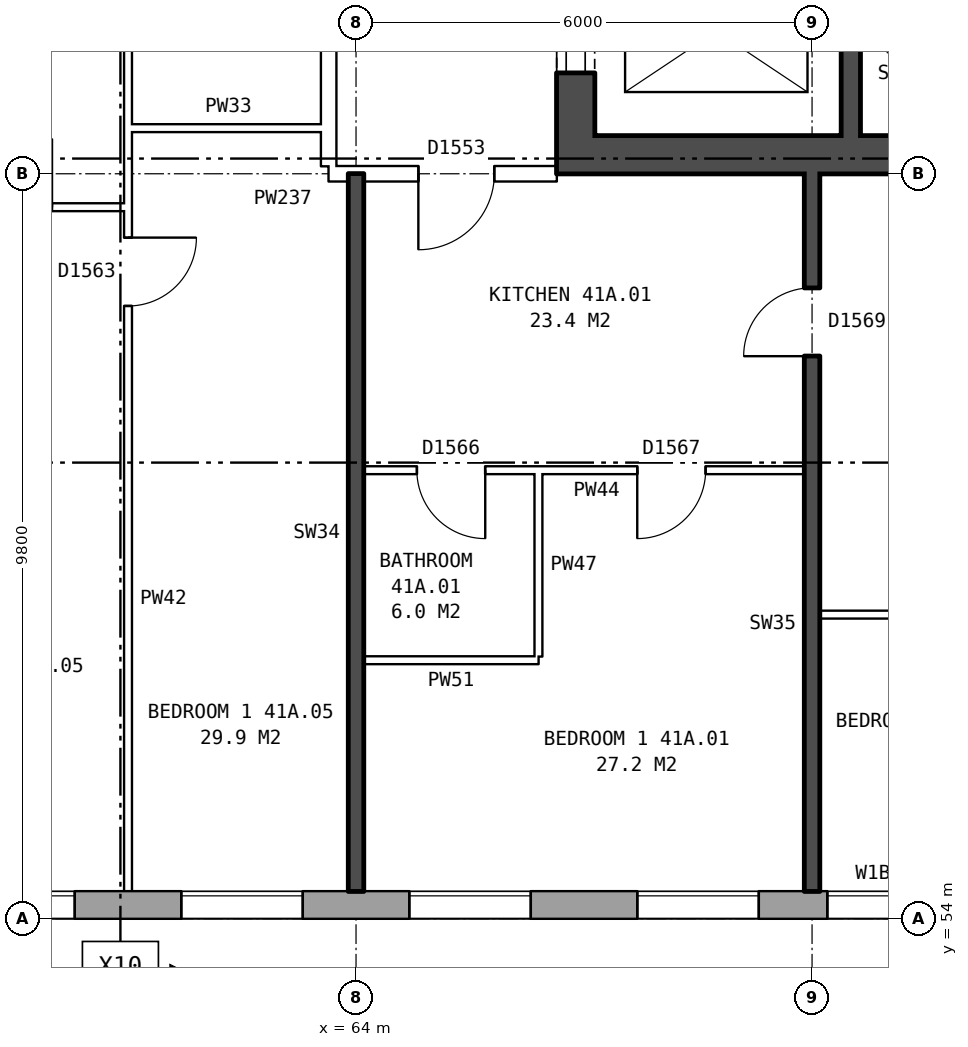
"""IFC4 building model, lengths in metres.
Left out: names, types, materials, properties, quantities, classifications, styles, units other than length and angle.
Written with IfcOpenShell. Run it as: python <this file> out.ifc"""

import sys

from ifc_helpers import new_model, si_unit, direction, frame, frame_2d, origin, place, context, subcontext, project, spatial, rectangle, extrude, element, fill, save


model = new_model("IFC4")
c1 = context("Model", 3, precision=1e-05, world=origin(), true_north=direction((0.0, 1.0)))
c2 = subcontext(c1, "Body", "Model", "MODEL_VIEW")
j1 = project(units=[si_unit("LENGTHUNIT", "METRE"), si_unit("PLANEANGLEUNIT", "RADIAN")], contexts=[c1])
p1 = place(None, origin())
s1 = spatial("IfcSite", under=j1, at=p1, CompositionType="ELEMENT")
p2 = place(p1, origin())
s2 = spatial("IfcBuilding", under=s1, at=p2, CompositionType="ELEMENT")
p3 = place(p2, frame((0.0, 0.0, 148.5)))
s3 = spatial("IfcBuildingStorey", under=s2, at=p3, CompositionType="ELEMENT", Elevation=148.5)
p4 = place(p3, frame((31.575, 54.18, 0.0), z_axis=(0.0, 0.0, 1.0), x_axis=(1.0, 0.0, 0.0)))
e1 = element("IfcWall", 1, at=p4, inside=s3, PredefinedType="STANDARD", context=c2, shape_type="SweptSolid", body=[
    extrude(rectangle(XDim=41.351, YDim=0.36, at=frame_2d((20.675, 0.0))), origin(), (0.0, 0.0, 1.0), 2.85),
])
p5 = place(p4, frame((3.125, 0.0, 0.8)))
e2 = element("IfcOpeningElement", 2, at=p5, cuts=e1, PredefinedType="OPENING", context=c2, shape_type="SweptSolid", body=[
    extrude(rectangle(XDim=1.6, YDim=1.8, at=frame_2d((0.8, 0.9))), frame((0.0, 0.19, 0.0), z_axis=(0.0, -1.0, 0.0), x_axis=(1.0, 0.0, 0.0)), (0.0, 0.0, 1.0), 0.38),
])
p6 = place(p4, frame((6.125, 0.0, 0.8)))
e3 = element("IfcOpeningElement", 3, at=p6, cuts=e1, PredefinedType="OPENING", context=c2, shape_type="SweptSolid", body=[
    extrude(rectangle(XDim=1.6, YDim=1.8, at=frame_2d((0.8, 0.9))), frame((0.0, 0.19, 0.0), z_axis=(0.0, -1.0, 0.0), x_axis=(1.0, 0.0, 0.0)), (0.0, 0.0, 1.0), 0.38),
])
p7 = place(p4, frame((9.125, 0.0, 0.8)))
e4 = element("IfcOpeningElement", 4, at=p7, cuts=e1, PredefinedType="OPENING", context=c2, shape_type="SweptSolid", body=[
    extrude(rectangle(XDim=1.6, YDim=1.8, at=frame_2d((0.8, 0.9))), frame((0.0, 0.19, 0.0), z_axis=(0.0, -1.0, 0.0), x_axis=(1.0, 0.0, 0.0)), (0.0, 0.0, 1.0), 0.38),
])
p8 = place(p4, frame((12.125, 0.0, 0.8)))
e5 = element("IfcOpeningElement", 5, at=p8, cuts=e1, PredefinedType="OPENING", context=c2, shape_type="SweptSolid", body=[
    extrude(rectangle(XDim=1.6, YDim=1.8, at=frame_2d((0.8, 0.9))), frame((0.0, 0.19, 0.0), z_axis=(0.0, -1.0, 0.0), x_axis=(1.0, 0.0, 0.0)), (0.0, 0.0, 1.0), 0.38),
])
p9 = place(p4, frame((15.125, 0.0, 0.8)))
e6 = element("IfcOpeningElement", 6, at=p9, cuts=e1, PredefinedType="OPENING", context=c2, shape_type="SweptSolid", body=[
    extrude(rectangle(XDim=1.6, YDim=1.8, at=frame_2d((0.8, 0.9))), frame((0.0, 0.19, 0.0), z_axis=(0.0, -1.0, 0.0), x_axis=(1.0, 0.0, 0.0)), (0.0, 0.0, 1.0), 0.38),
])
p10 = place(p4, frame((18.125, 0.0, 0.8)))
e7 = element("IfcOpeningElement", 7, at=p10, cuts=e1, PredefinedType="OPENING", context=c2, shape_type="SweptSolid", body=[
    extrude(rectangle(XDim=1.6, YDim=1.8, at=frame_2d((0.8, 0.9))), frame((0.0, 0.19, 0.0), z_axis=(0.0, -1.0, 0.0), x_axis=(1.0, 0.0, 0.0)), (0.0, 0.0, 1.0), 0.38),
])
p11 = place(p4, frame((21.125, 0.0, 0.8)))
e8 = element("IfcOpeningElement", 8, at=p11, cuts=e1, PredefinedType="OPENING", context=c2, shape_type="SweptSolid", body=[
    extrude(rectangle(XDim=1.6, YDim=1.8, at=frame_2d((0.8, 0.9))), frame((0.0, 0.19, 0.0), z_axis=(0.0, -1.0, 0.0), x_axis=(1.0, 0.0, 0.0)), (0.0, 0.0, 1.0), 0.38),
])
p12 = place(p4, frame((24.125, 0.0, 0.8)))
e9 = element("IfcOpeningElement", 9, at=p12, cuts=e1, PredefinedType="OPENING", context=c2, shape_type="SweptSolid", body=[
    extrude(rectangle(XDim=1.6, YDim=1.8, at=frame_2d((0.8, 0.9))), frame((0.0, 0.19, 0.0), z_axis=(0.0, -1.0, 0.0), x_axis=(1.0, 0.0, 0.0)), (0.0, 0.0, 1.0), 0.38),
])
p13 = place(p4, frame((27.125, 0.0, 0.8)))
e10 = element("IfcOpeningElement", 10, at=p13, cuts=e1, PredefinedType="OPENING", context=c2, shape_type="SweptSolid", body=[
    extrude(rectangle(XDim=1.6, YDim=1.8, at=frame_2d((0.8, 0.9))), frame((0.0, 0.19, 0.0), z_axis=(0.0, -1.0, 0.0), x_axis=(1.0, 0.0, 0.0)), (0.0, 0.0, 1.0), 0.38),
])
p14 = place(p4, frame((30.125, 0.0, 0.8)))
e11 = element("IfcOpeningElement", 11, at=p14, cuts=e1, PredefinedType="OPENING", context=c2, shape_type="SweptSolid", body=[
    extrude(rectangle(XDim=1.6, YDim=1.8, at=frame_2d((0.8, 0.9))), frame((0.0, 0.19, 0.0), z_axis=(0.0, -1.0, 0.0), x_axis=(1.0, 0.0, 0.0)), (0.0, 0.0, 1.0), 0.38),
])
p15 = place(p4, frame((33.125, 0.0, 0.8)))
e12 = element("IfcOpeningElement", 12, at=p15, cuts=e1, PredefinedType="OPENING", context=c2, shape_type="SweptSolid", body=[
    extrude(rectangle(XDim=1.6, YDim=1.8, at=frame_2d((0.8, 0.9))), frame((0.0, 0.19, 0.0), z_axis=(0.0, -1.0, 0.0), x_axis=(1.0, 0.0, 0.0)), (0.0, 0.0, 1.0), 0.38),
])
p16 = place(p4, frame((36.125, 0.0, 0.8)))
e13 = element("IfcOpeningElement", 13, at=p16, cuts=e1, PredefinedType="OPENING", context=c2, shape_type="SweptSolid", body=[
    extrude(rectangle(XDim=1.6, YDim=1.8, at=frame_2d((0.8, 0.9))), frame((0.0, 0.19, 0.0), z_axis=(0.0, -1.0, 0.0), x_axis=(1.0, 0.0, 0.0)), (0.0, 0.0, 1.0), 0.38),
])
p17 = place(p4, frame((38.625, 0.0, 0.8)))
e14 = element("IfcOpeningElement", 14, at=p17, cuts=e1, PredefinedType="OPENING", context=c2, shape_type="SweptSolid", body=[
    extrude(rectangle(XDim=1.2, YDim=1.8, at=frame_2d((0.6, 0.9))), frame((0.0, 0.19, 0.0), z_axis=(0.0, -1.0, 0.0), x_axis=(1.0, 0.0, 0.0)), (0.0, 0.0, 1.0), 0.38),
])
p18 = place(p4, frame((40.125, 0.0, 0.8)))
e15 = element("IfcOpeningElement", 15, at=p18, cuts=e1, PredefinedType="OPENING", context=c2, shape_type="SweptSolid", body=[
    extrude(rectangle(XDim=0.8, YDim=0.9, at=frame_2d((0.4, 0.45))), frame((0.0, 0.19, 0.0), z_axis=(0.0, -1.0, 0.0), x_axis=(1.0, 0.0, 0.0)), (0.0, 0.0, 1.0), 0.38),
])
p19 = place(p3, frame((66.89, 63.8, 0.0), z_axis=(0.0, 0.0, 1.0), x_axis=(0.0, 1.0, 0.0)))
e16 = element("IfcWall", 16, at=p19, inside=s3, PredefinedType="SHEAR", context=c2, shape_type="SweptSolid", body=[
    extrude(rectangle(XDim=12.4, YDim=0.5, at=frame_2d((6.2, 0.0))), origin(), (0.0, 0.0, 1.0), 2.85),
])
p20 = place(p19, frame((1.325, 0.0, 0.0)))
e17 = element("IfcOpeningElement", 17, at=p20, cuts=e16, PredefinedType="OPENING", context=c2, shape_type="SweptSolid", body=[
    extrude(rectangle(XDim=1.1, YDim=2.1, at=frame_2d((0.55, 1.05))), frame((0.0, 0.26, 0.0), z_axis=(0.0, -1.0, 0.0), x_axis=(1.0, 0.0, 0.0)), (0.0, 0.0, 1.0), 0.52),
])
p21 = place(p19, frame((3.6, 0.0, 0.0)))
e18 = element("IfcOpeningElement", 18, at=p21, cuts=e16, PredefinedType="OPENING", context=c2, shape_type="SweptSolid", body=[
    extrude(rectangle(XDim=1.1, YDim=2.1, at=frame_2d((0.55, 1.05))), frame((0.0, 0.26, 0.0), z_axis=(0.0, -1.0, 0.0), x_axis=(1.0, 0.0, 0.0)), (0.0, 0.0, 1.0), 0.52),
])
p22 = place(p19, frame((5.8, 0.0, 0.0)))
e19 = element("IfcOpeningElement", 19, at=p22, cuts=e16, PredefinedType="OPENING", context=c2, shape_type="SweptSolid", body=[
    extrude(rectangle(XDim=1.1, YDim=2.1, at=frame_2d((0.55, 1.05))), frame((0.0, 0.26, 0.0), z_axis=(0.0, -1.0, 0.0), x_axis=(1.0, 0.0, 0.0)), (0.0, 0.0, 1.0), 0.52),
])
p23 = place(p19, frame((8.0, 0.0, 0.0)))
e20 = element("IfcOpeningElement", 20, at=p23, cuts=e16, PredefinedType="OPENING", context=c2, shape_type="SweptSolid", body=[
    extrude(rectangle(XDim=1.1, YDim=2.1, at=frame_2d((0.55, 1.05))), frame((0.0, 0.26, 0.0), z_axis=(0.0, -1.0, 0.0), x_axis=(1.0, 0.0, 0.0)), (0.0, 0.0, 1.0), 0.52),
])
p24 = place(p19, frame((9.9, 0.0, 0.0)))
e21 = element("IfcOpeningElement", 21, at=p24, cuts=e16, PredefinedType="OPENING", context=c2, shape_type="SweptSolid", body=[
    extrude(rectangle(XDim=1.1, YDim=2.1, at=frame_2d((0.55, 1.05))), frame((0.0, 0.26, 0.0), z_axis=(0.0, -1.0, 0.0), x_axis=(1.0, 0.0, 0.0)), (0.0, 0.0, 1.0), 0.52),
])
p25 = place(p3, frame((67.14, 64.05, 0.0), z_axis=(0.0, 0.0, 1.0), x_axis=(1.0, 0.0, 0.0)))
e22 = element("IfcWall", 22, at=p25, inside=s3, PredefinedType="SHEAR", context=c2, shape_type="SweptSolid", body=[
    extrude(rectangle(XDim=8.0, YDim=0.5, at=frame_2d((4.0, 0.0))), origin(), (0.0, 0.0, 1.0), 2.85),
])
p26 = place(p3, frame((70.51, 64.3, 0.0), z_axis=(0.0, 0.0, 1.0), x_axis=(0.0, 1.0, 0.0)))
e23 = element("IfcWall", 23, at=p26, inside=s3, PredefinedType="SHEAR", context=c2, shape_type="SweptSolid", body=[
    extrude(rectangle(XDim=2.425, YDim=0.25, at=frame_2d((1.212, 0.0))), origin(), (0.0, 0.0, 1.0), 2.85),
])
p27 = place(p3, frame((63.64, 63.9, 0.0), z_axis=(0.0, 0.0, 1.0), x_axis=(0.0, 1.0, 0.0)))
e24 = element("IfcWall", 24, at=p27, inside=s3, PredefinedType="PARTITIONING", context=c2, shape_type="SweptSolid", body=[
    extrude(rectangle(XDim=12.2, YDim=0.2, at=frame_2d((6.1, 0.0))), origin(), (0.0, 0.0, 1.0), 2.85),
])
p28 = place(p27, frame((5.1, 0.0, 0.0)))
e25 = element("IfcOpeningElement", 25, at=p28, cuts=e24, PredefinedType="OPENING", context=c2, shape_type="SweptSolid", body=[
    extrude(rectangle(XDim=2.0, YDim=2.1, at=frame_2d((1.0, 1.05))), frame((0.0, 0.11, 0.0), z_axis=(0.0, -1.0, 0.0), x_axis=(1.0, 0.0, 0.0)), (0.0, 0.0, 1.0), 0.22),
])
p29 = place(p3, frame((64.1, 57.4, 0.0), z_axis=(0.0, 0.0, 1.0), x_axis=(1.0, 0.0, 0.0)))
e26 = element("IfcWall", 26, at=p29, inside=s3, PredefinedType="PARTITIONING", context=c2, shape_type="SweptSolid", body=[
    extrude(rectangle(XDim=2.3, YDim=0.1, at=frame_2d((1.15, 0.0))), origin(), (0.0, 0.0, 1.0), 2.85),
])
p30 = place(p3, frame((70.1, 58.0, 0.0), z_axis=(0.0, 0.0, 1.0), x_axis=(1.0, 0.0, 0.0)))
e27 = element("IfcWall", 27, at=p30, inside=s3, PredefinedType="PARTITIONING", context=c2, shape_type="SweptSolid", body=[
    extrude(rectangle(XDim=5.54, YDim=0.1, at=frame_2d((2.77, 0.0))), origin(), (0.0, 0.0, 1.0), 2.85),
])
p31 = place(p30, frame((2.32, 0.0, 0.0)))
e28 = element("IfcOpeningElement", 28, at=p31, cuts=e27, PredefinedType="OPENING", context=c2, shape_type="SweptSolid", body=[
    extrude(rectangle(XDim=0.9, YDim=2.1, at=frame_2d((0.45, 1.05))), frame((0.0, 0.06, 0.0), z_axis=(0.0, -1.0, 0.0), x_axis=(1.0, 0.0, 0.0)), (0.0, 0.0, 1.0), 0.12),
])
p32 = place(p3, frame((64.1, 59.9, 0.0), z_axis=(0.0, 0.0, 1.0), x_axis=(1.0, 0.0, 0.0)))
e29 = element("IfcWall", 29, at=p32, inside=s3, PredefinedType="PARTITIONING", context=c2, shape_type="SweptSolid", body=[
    extrude(rectangle(XDim=5.8, YDim=0.1, at=frame_2d((2.9, 0.0))), origin(), (0.0, 0.0, 1.0), 2.85),
])
p33 = place(p32, frame((3.6, 0.0, 0.0)))
e30 = element("IfcOpeningElement", 30, at=p33, cuts=e29, PredefinedType="OPENING", context=c2, shape_type="SweptSolid", body=[
    extrude(rectangle(XDim=0.9, YDim=2.1, at=frame_2d((0.45, 1.05))), frame((0.0, 0.06, 0.0), z_axis=(0.0, -1.0, 0.0), x_axis=(1.0, 0.0, 0.0)), (0.0, 0.0, 1.0), 0.12),
])
p34 = place(p32, frame((0.7, 0.0, 0.0)))
e31 = element("IfcOpeningElement", 31, at=p34, cuts=e29, PredefinedType="OPENING", context=c2, shape_type="SweptSolid", body=[
    extrude(rectangle(XDim=0.9, YDim=2.1, at=frame_2d((0.45, 1.05))), frame((0.0, 0.06, 0.0), z_axis=(0.0, -1.0, 0.0), x_axis=(1.0, 0.0, 0.0)), (0.0, 0.0, 1.0), 0.12),
])
p35 = place(p3, frame((58.1, 63.36, 0.0), z_axis=(0.0, 0.0, 1.0), x_axis=(1.0, 0.0, 0.0)))
e32 = element("IfcWall", 32, at=p35, inside=s3, PredefinedType="PARTITIONING", context=c2, shape_type="SweptSolid", body=[
    extrude(rectangle(XDim=2.9, YDim=0.1, at=frame_2d((1.45, 0.0))), origin(), (0.0, 0.0, 1.0), 2.85),
])
p36 = place(p35, frame((1.0, 0.0, 0.0)))
e33 = element("IfcOpeningElement", 33, at=p36, cuts=e32, PredefinedType="OPENING", context=c2, shape_type="SweptSolid", body=[
    extrude(rectangle(XDim=0.9, YDim=2.1, at=frame_2d((0.45, 1.05))), frame((0.0, 0.06, 0.0), z_axis=(0.0, -1.0, 0.0), x_axis=(1.0, 0.0, 0.0)), (0.0, 0.0, 1.0), 0.12),
])
p37 = place(p3, frame((63.64, 63.8, 0.0), z_axis=(0.0, 0.0, 1.0), x_axis=(1.0, 0.0, 0.0)))
e34 = element("IfcWall", 34, at=p37, inside=s3, PredefinedType="PARTITIONING", context=c2, shape_type="SweptSolid", body=[
    extrude(rectangle(XDim=3.0, YDim=0.2, at=frame_2d((1.5, 0.0))), origin(), (0.0, 0.0, 1.0), 2.85),
])
p38 = place(p37, frame((1.18, 0.0, 0.0)))
e35 = element("IfcOpeningElement", 35, at=p38, cuts=e34, PredefinedType="OPENING", context=c2, shape_type="SweptSolid", body=[
    extrude(rectangle(XDim=1.0, YDim=2.1, at=frame_2d((0.5, 1.05))), frame((0.0, 0.11, 0.0), z_axis=(0.0, -1.0, 0.0), x_axis=(1.0, 0.0, 0.0)), (0.0, 0.0, 1.0), 0.22),
])
p39 = place(p3, frame((61.0, 64.4, 0.0), z_axis=(0.0, 0.0, 1.0), x_axis=(1.0, 0.0, 0.0)))
e36 = element("IfcWall", 36, at=p39, inside=s3, PredefinedType="PARTITIONING", context=c2, shape_type="SweptSolid", body=[
    extrude(rectangle(XDim=2.64, YDim=0.1, at=frame_2d((1.32, 0.0))), origin(), (0.0, 0.0, 1.0), 2.85),
])
p40 = place(p3, frame((61.0, 54.36, 0.0), z_axis=(0.0, 0.0, 1.0), x_axis=(0.0, 1.0, 0.0)))
e37 = element("IfcWall", 37, at=p40, inside=s3, PredefinedType="PARTITIONING", context=c2, shape_type="SweptSolid", body=[
    extrude(rectangle(XDim=14.34, YDim=0.1, at=frame_2d((7.17, 0.0))), origin(), (0.0, 0.0, 1.0), 2.85),
])
p41 = place(p40, frame((7.7, 0.0, 0.0)))
e38 = element("IfcOpeningElement", 38, at=p41, cuts=e37, PredefinedType="OPENING", context=c2, shape_type="SweptSolid", body=[
    extrude(rectangle(XDim=0.9, YDim=2.1, at=frame_2d((0.45, 1.05))), frame((0.0, 0.06, 0.0), z_axis=(0.0, -1.0, 0.0), x_axis=(1.0, 0.0, 0.0)), (0.0, 0.0, 1.0), 0.12),
])
p42 = place(p40, frame((13.04, 0.0, 0.0)))
e39 = element("IfcOpeningElement", 39, at=p42, cuts=e37, PredefinedType="OPENING", context=c2, shape_type="SweptSolid", body=[
    extrude(rectangle(XDim=0.9, YDim=2.1, at=frame_2d((0.45, 1.05))), frame((0.0, 0.06, 0.0), z_axis=(0.0, -1.0, 0.0), x_axis=(1.0, 0.0, 0.0)), (0.0, 0.0, 1.0), 0.12),
])
p43 = place(p3, frame((64.0, 54.36, 0.0), z_axis=(0.0, 0.0, 1.0), x_axis=(0.0, 1.0, 0.0)))
e40 = element("IfcWall", 40, at=p43, inside=s3, PredefinedType="SOLIDWALL", context=c2, shape_type="SweptSolid", body=[
    extrude(rectangle(XDim=9.44, YDim=0.2, at=frame_2d((4.72, 0.0))), origin(), (0.0, 0.0, 1.0), 2.85),
])
p44 = place(p3, frame((66.4, 57.45, 0.0), z_axis=(0.0, 0.0, 1.0), x_axis=(0.0, 1.0, 0.0)))
e41 = element("IfcWall", 41, at=p44, inside=s3, PredefinedType="PARTITIONING", context=c2, shape_type="SweptSolid", body=[
    extrude(rectangle(XDim=2.4, YDim=0.1, at=frame_2d((1.2, 0.0))), origin(), (0.0, 0.0, 1.0), 2.85),
])
p45 = place(p3, frame((70.0, 54.36, 0.0), z_axis=(0.0, 0.0, 1.0), x_axis=(0.0, 1.0, 0.0)))
e42 = element("IfcWall", 42, at=p45, inside=s3, PredefinedType="SOLIDWALL", context=c2, shape_type="SweptSolid", body=[
    extrude(rectangle(XDim=9.44, YDim=0.2, at=frame_2d((4.72, 0.0))), origin(), (0.0, 0.0, 1.0), 2.85),
])
p46 = place(p45, frame((7.04, 0.0, 0.0)))
e43 = element("IfcOpeningElement", 43, at=p46, cuts=e42, PredefinedType="OPENING", context=c2, shape_type="SweptSolid", body=[
    extrude(rectangle(XDim=0.9, YDim=2.1, at=frame_2d((0.45, 1.05))), frame((0.0, 0.11, 0.0), z_axis=(0.0, -1.0, 0.0), x_axis=(1.0, 0.0, 0.0)), (0.0, 0.0, 1.0), 0.22),
])
p47 = place(p13, origin())
e44 = element("IfcWindow", 44, at=p47, inside=s3, PartitioningType="SINGLE_PANEL", PredefinedType="WINDOW", context=c2, shape_type="SweptSolid", body=[
    extrude(rectangle(XDim=1.6, YDim=1.8, at=frame_2d((0.8, 0.9))), frame((0.0, 0.15, 0.0), z_axis=(0.0, -1.0, 0.0), x_axis=(1.0, 0.0, 0.0)), (0.0, 0.0, 1.0), 0.06),
])
fill(e10, e44)
p48 = place(p14, origin())
e45 = element("IfcWindow", 45, at=p48, inside=s3, PartitioningType="SINGLE_PANEL", PredefinedType="WINDOW", context=c2, shape_type="SweptSolid", body=[
    extrude(rectangle(XDim=1.6, YDim=1.8, at=frame_2d((0.8, 0.9))), frame((0.0, 0.15, 0.0), z_axis=(0.0, -1.0, 0.0), x_axis=(1.0, 0.0, 0.0)), (0.0, 0.0, 1.0), 0.06),
])
fill(e11, e45)
p49 = place(p15, origin())
e46 = element("IfcWindow", 46, at=p49, inside=s3, PartitioningType="SINGLE_PANEL", PredefinedType="WINDOW", context=c2, shape_type="SweptSolid", body=[
    extrude(rectangle(XDim=1.6, YDim=1.8, at=frame_2d((0.8, 0.9))), frame((0.0, 0.15, 0.0), z_axis=(0.0, -1.0, 0.0), x_axis=(1.0, 0.0, 0.0)), (0.0, 0.0, 1.0), 0.06),
])
fill(e12, e46)
p50 = place(p16, origin())
e47 = element("IfcWindow", 47, at=p50, inside=s3, PartitioningType="SINGLE_PANEL", PredefinedType="WINDOW", context=c2, shape_type="SweptSolid", body=[
    extrude(rectangle(XDim=1.6, YDim=1.8, at=frame_2d((0.8, 0.9))), frame((0.0, 0.15, 0.0), z_axis=(0.0, -1.0, 0.0), x_axis=(1.0, 0.0, 0.0)), (0.0, 0.0, 1.0), 0.06),
])
fill(e13, e47)
p51 = place(p17, origin())
e48 = element("IfcWindow", 48, at=p51, inside=s3, PartitioningType="SINGLE_PANEL", PredefinedType="WINDOW", context=c2, shape_type="SweptSolid", body=[
    extrude(rectangle(XDim=1.2, YDim=1.8, at=frame_2d((0.6, 0.9))), frame((0.0, 0.15, 0.0), z_axis=(0.0, -1.0, 0.0), x_axis=(1.0, 0.0, 0.0)), (0.0, 0.0, 1.0), 0.06),
])
fill(e14, e48)
p52 = place(p20, origin())
e49 = element("IfcDoor", 49, at=p52, inside=s3, OperationType="DOUBLE_DOOR_SLIDING", PredefinedType="DOOR", context=c2, shape_type="SweptSolid", body=[
    extrude(rectangle(XDim=1.1, YDim=2.1, at=frame_2d((0.55, 1.05))), frame((0.0, -0.185, 0.0), z_axis=(0.0, -1.0, 0.0), x_axis=(1.0, 0.0, 0.0)), (0.0, 0.0, 1.0), 0.05),
])
fill(e17, e49)
p53 = place(p33, frame((0.9, 0.0, 0.0), z_axis=(0.0, 0.0, 1.0), x_axis=(-1.0, 0.0, 0.0)))
e50 = element("IfcDoor", 50, at=p53, inside=s3, OperationType="SINGLE_SWING_RIGHT", PredefinedType="DOOR", context=c2, shape_type="SweptSolid", body=[
    extrude(rectangle(XDim=0.9, YDim=2.1, at=frame_2d((0.45, 1.05))), frame((0.0, 0.025, 0.0), z_axis=(0.0, -1.0, 0.0), x_axis=(1.0, 0.0, 0.0)), (0.0, 0.0, 1.0), 0.05),
])
fill(e30, e50)
p54 = place(p38, frame((1.0, 0.0, 0.0), z_axis=(0.0, 0.0, 1.0), x_axis=(-1.0, 0.0, 0.0)))
e51 = element("IfcDoor", 51, at=p54, inside=s3, OperationType="SINGLE_SWING_RIGHT", PredefinedType="DOOR", context=c2, shape_type="SweptSolid", body=[
    extrude(rectangle(XDim=1.0, YDim=2.1, at=frame_2d((0.5, 1.05))), frame((0.0, 0.025, 0.0), z_axis=(0.0, -1.0, 0.0), x_axis=(1.0, 0.0, 0.0)), (0.0, 0.0, 1.0), 0.05),
])
fill(e35, e51)
p55 = place(p46, origin())
e52 = element("IfcDoor", 52, at=p55, inside=s3, OperationType="SINGLE_SWING_LEFT", PredefinedType="DOOR", context=c2, shape_type="SweptSolid", body=[
    extrude(rectangle(XDim=0.9, YDim=2.1, at=frame_2d((0.45, 1.05))), frame((0.0, 0.025, 0.0), z_axis=(0.0, -1.0, 0.0), x_axis=(1.0, 0.0, 0.0)), (0.0, 0.0, 1.0), 0.05),
])
fill(e43, e52)
p56 = place(p34, frame((0.9, 0.0, 0.0), z_axis=(0.0, 0.0, 1.0), x_axis=(-1.0, 0.0, 0.0)))
e53 = element("IfcDoor", 53, at=p56, inside=s3, OperationType="SINGLE_SWING_LEFT", PredefinedType="DOOR", context=c2, shape_type="SweptSolid", body=[
    extrude(rectangle(XDim=0.9, YDim=2.1, at=frame_2d((0.45, 1.05))), frame((0.0, 0.025, 0.0), z_axis=(0.0, -1.0, 0.0), x_axis=(1.0, 0.0, 0.0)), (0.0, 0.0, 1.0), 0.05),
])
fill(e31, e53)
p57 = place(p41, frame((0.9, 0.0, 0.0), z_axis=(0.0, 0.0, 1.0), x_axis=(-1.0, 0.0, 0.0)))
e54 = element("IfcDoor", 54, at=p57, inside=s3, OperationType="SINGLE_SWING_LEFT", PredefinedType="DOOR", context=c2, shape_type="SweptSolid", body=[
    extrude(rectangle(XDim=0.9, YDim=2.1, at=frame_2d((0.45, 1.05))), frame((0.0, 0.025, 0.0), z_axis=(0.0, -1.0, 0.0), x_axis=(1.0, 0.0, 0.0)), (0.0, 0.0, 1.0), 0.05),
])
fill(e38, e54)
save(model, sys.argv[1])
